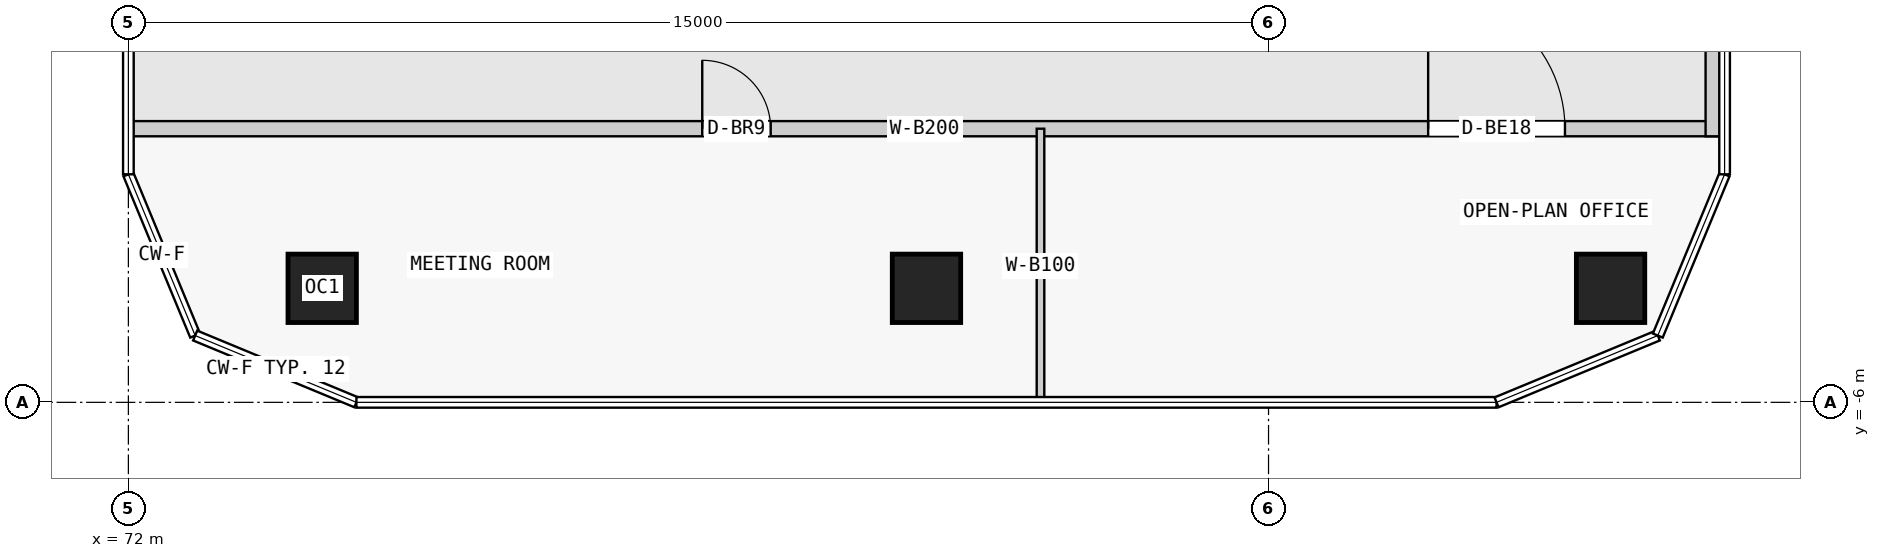
"""IFC4 building model, lengths in metres.
Left out: names, types, materials, properties, quantities, classifications, styles, units other than length and angle.
Written with IfcOpenShell. Run it as: python <this file> out.ifc"""

import sys

from ifc_helpers import new_model, si_unit, direction, frame, frame_2d, origin, origin_2d, place, context, subcontext, project, spatial, rectangle, extrude, element, fill, save


model = new_model("IFC4")
c1 = context("Model", 3, precision=1e-05, world=origin(), true_north=direction((0.0, 1.0)))
c2 = subcontext(c1, "Body", "Model", "MODEL_VIEW")
j1 = project(units=[si_unit("LENGTHUNIT", "METRE"), si_unit("PLANEANGLEUNIT", "RADIAN")], contexts=[c1])
p1 = place(None, origin())
s1 = spatial("IfcSite", under=j1, at=p1, CompositionType="ELEMENT")
p2 = place(p1, origin())
s2 = spatial("IfcBuilding", under=s1, at=p2, CompositionType="ELEMENT")
p3 = place(p2, frame((0.0, 0.0, 120.3)))
s3 = spatial("IfcBuildingStorey", under=s2, at=p3, CompositionType="ELEMENT", Elevation=120.3)
for number, where, z_axis, x_axis in (
    (1, (74.55, -4.5, 0.0), (0.0, 0.0, 1.0), (1.0, 0.0, 0.0)),
    (2, (82.5, -4.5, 0.0), (0.0, 0.0, 1.0), (1.0, 0.0, 0.0)),
    (3, (91.5, -4.5, 0.0), (0.0, 0.0, 1.0), (1.0, 0.0, 0.0)),
):
    element("IfcColumn", number, at=place(p3, frame(where, z_axis=z_axis, x_axis=x_axis)), inside=s3, PredefinedType="COLUMN", context=c2, shape_type="SweptSolid", body=[
        extrude(rectangle(XDim=0.9, YDim=0.9, at=origin_2d()), origin(), (0.0, 0.0, 1.0), 3.5),
    ])
p4 = place(p3, frame((72.0, -2.4, 0.0), z_axis=(0.0, 0.0, 1.0), x_axis=(1.0, 0.0, 0.0)))
e4 = element("IfcWall", 4, at=p4, inside=s3, PredefinedType="PARTITIONING", context=c2, shape_type="SweptSolid", body=[
    extrude(rectangle(XDim=20.95, YDim=0.2, at=frame_2d((10.475, 0.0))), origin(), (0.0, 0.0, 1.0), 3.2),
])
p5 = place(p4, frame((7.55, 0.0, 0.0)))
e5 = element("IfcOpeningElement", 5, at=p5, cuts=e4, PredefinedType="OPENING", context=c2, shape_type="SweptSolid", body=[
    extrude(rectangle(XDim=0.9, YDim=2.1, at=frame_2d((0.45, 1.05))), frame((0.0, 0.11, 0.0), z_axis=(0.0, -1.0, 0.0), x_axis=(1.0, 0.0, 0.0)), (0.0, 0.0, 1.0), 0.22),
])
p6 = place(p4, frame((17.1, 0.0, 0.0)))
e6 = element("IfcOpeningElement", 6, at=p6, cuts=e4, PredefinedType="OPENING", context=c2, shape_type="SweptSolid", body=[
    extrude(rectangle(XDim=1.8, YDim=2.1, at=frame_2d((0.9, 1.05))), frame((0.0, 0.11, 0.0), z_axis=(0.0, -1.0, 0.0), x_axis=(1.0, 0.0, 0.0)), (0.0, 0.0, 1.0), 0.22),
])
p7 = place(p3, frame((92.85, -2.5, 0.0), z_axis=(0.0, 0.0, 1.0), x_axis=(0.0, 1.0, 0.0)))
e7 = element("IfcWall", 7, at=p7, inside=s3, PredefinedType="PARTITIONING", context=c2, shape_type="SweptSolid", body=[
    extrude(rectangle(XDim=23.0, YDim=0.2, at=frame_2d((11.5, 0.0))), origin(), (0.0, 0.0, 1.0), 3.2),
])
p8 = place(p3, frame((84.0, -6.0, 0.0), z_axis=(0.0, 0.0, 1.0), x_axis=(0.0, 1.0, 0.0)))
e8 = element("IfcWall", 8, at=p8, inside=s3, PredefinedType="PARTITIONING", context=c2, shape_type="SweptSolid", body=[
    extrude(rectangle(XDim=3.6, YDim=0.1, at=frame_2d((1.8, 0.0))), origin(), (0.0, 0.0, 1.0), 3.2),
])
p9 = place(p5, origin())
e9 = element("IfcDoor", 9, at=p9, inside=s3, OperationType="SINGLE_SWING_LEFT", PredefinedType="DOOR", context=c2, shape_type="SweptSolid", body=[
    extrude(rectangle(XDim=0.9, YDim=2.1, at=frame_2d((0.45, 1.05))), frame((0.0, 0.025, 0.0), z_axis=(0.0, -1.0, 0.0), x_axis=(1.0, 0.0, 0.0)), (0.0, 0.0, 1.0), 0.05),
])
fill(e5, e9)
p10 = place(p6, origin())
e10 = element("IfcDoor", 10, at=p10, inside=s3, OperationType="DOUBLE_DOOR_SINGLE_SWING", PredefinedType="DOOR", context=c2, shape_type="SweptSolid", body=[
    extrude(rectangle(XDim=1.8, YDim=2.1, at=frame_2d((0.9, 1.05))), frame((0.0, 0.025, 0.0), z_axis=(0.0, -1.0, 0.0), x_axis=(1.0, 0.0, 0.0)), (0.0, 0.0, 1.0), 0.05),
])
fill(e6, e10)
save(model, sys.argv[1])
